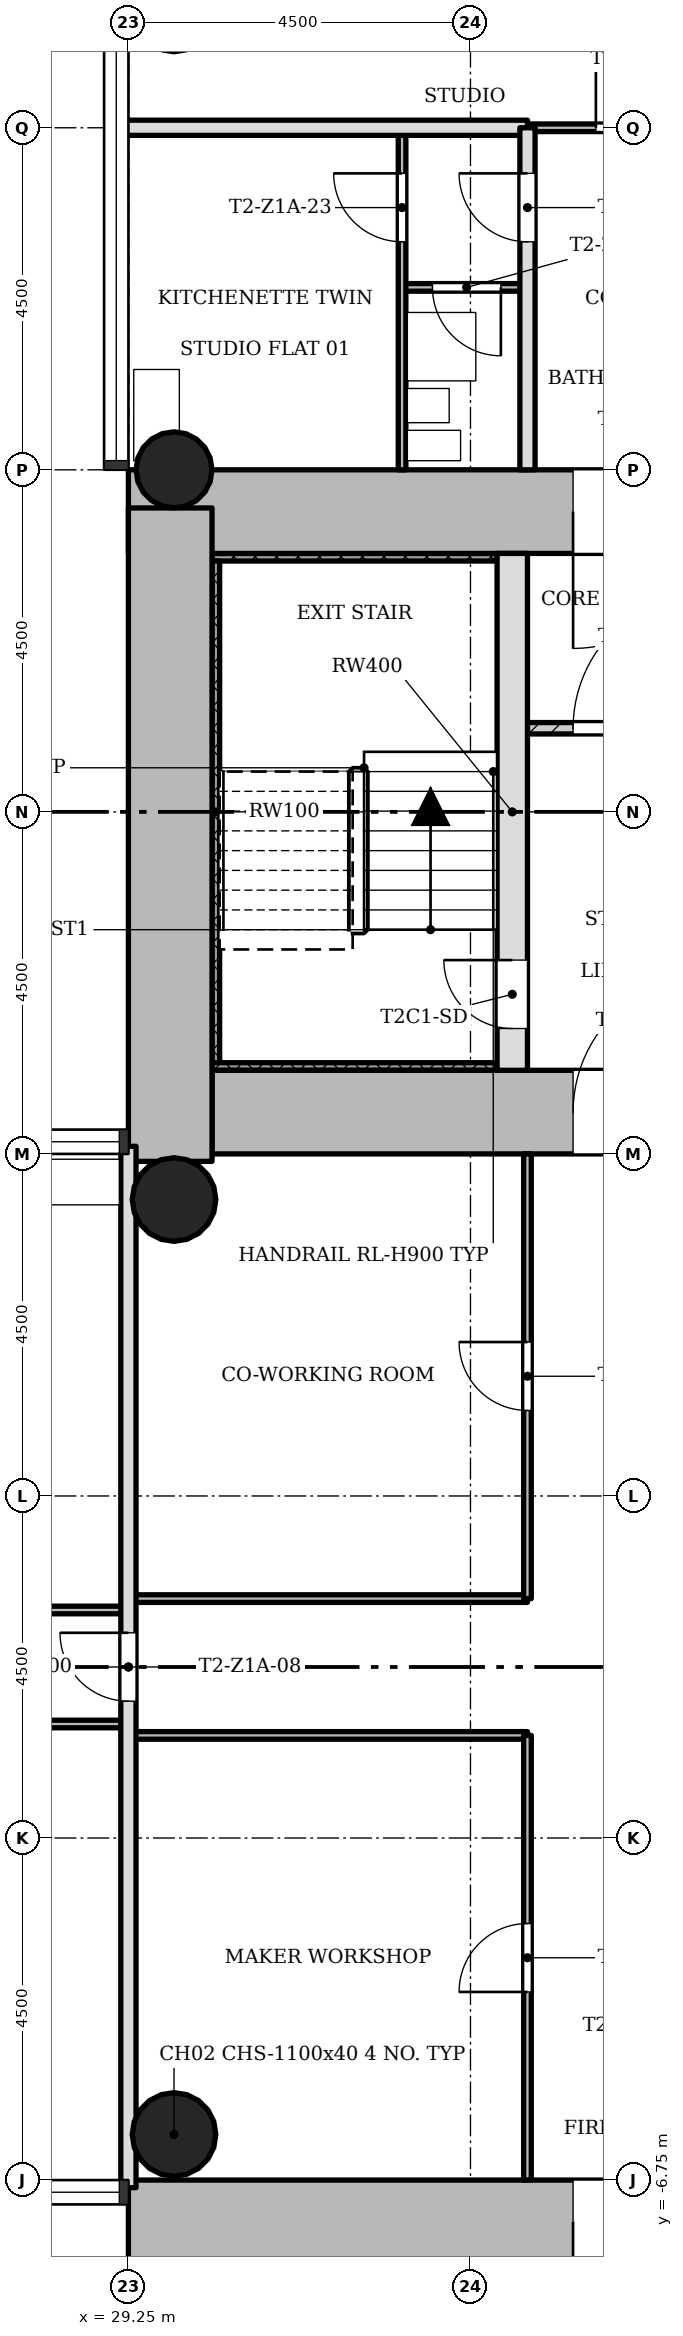
"""IFC4 building model, lengths in metres.
Left out: names, types, materials, properties, quantities, classifications, styles, units other than length and angle.
Written with IfcOpenShell. Run it as: python <this file> out.ifc"""

import sys

from ifc_helpers import new_model, si_unit, direction, frame, frame_2d, origin, origin_2d, place, context, subcontext, project, spatial, rectangle, hollow_circle, extrude, element, fill, save


model = new_model("IFC4")
c1 = context("Model", 3, precision=1e-05, world=origin(), true_north=direction((0.0, 1.0)))
c2 = subcontext(c1, "Body", "Model", "MODEL_VIEW")
j1 = project(units=[si_unit("LENGTHUNIT", "METRE"), si_unit("PLANEANGLEUNIT", "RADIAN")], contexts=[c1])
p1 = place(None, origin())
s1 = spatial("IfcSite", under=j1, at=p1, CompositionType="ELEMENT")
p2 = place(p1, origin())
s2 = spatial("IfcBuilding", under=s1, at=p2, CompositionType="ELEMENT")
p3 = place(p2, frame((0.0, 0.0, 27.9)))
s3 = spatial("IfcBuildingStorey", under=s2, at=p3, CompositionType="ELEMENT", Elevation=27.9)
p4 = place(p3, frame((30.35, 7.3, 0.0), z_axis=(0.0, 0.0, 1.0), x_axis=(1.0, 0.0, 0.0)))
e1 = element("IfcWall", 1, at=p4, inside=s3, PredefinedType="SHEAR", context=c2, shape_type="SweptSolid", body=[
    extrude(rectangle(XDim=12.4, YDim=1.1, at=frame_2d((6.2, 0.0))), origin(), (0.0, 0.0, 1.0), 3.4),
])
p5 = place(p4, frame((4.75, 0.0, 0.0)))
e2 = element("IfcOpeningElement", 2, at=p5, cuts=e1, PredefinedType="OPENING", context=c2, shape_type="SweptSolid", body=[
    extrude(rectangle(XDim=1.8, YDim=2.1, at=frame_2d((0.9, 1.05))), frame((0.0, 0.56, 0.0), z_axis=(0.0, -1.0, 0.0), x_axis=(1.0, 0.0, 0.0)), (0.0, 0.0, 1.0), 1.12),
])
p6 = place(p3, frame((41.65, 15.2, 0.0), z_axis=(0.0, 0.0, 1.0), x_axis=(-1.0, 0.0, 0.0)))
e3 = element("IfcWall", 3, at=p6, inside=s3, PredefinedType="SHEAR", context=c2, shape_type="SweptSolid", body=[
    extrude(rectangle(XDim=12.4, YDim=1.1, at=frame_2d((6.2, 0.0))), origin(), (0.0, 0.0, 1.0), 3.4),
])
p7 = place(p6, frame((4.75, 0.0, 0.0)))
e4 = element("IfcOpeningElement", 4, at=p7, cuts=e3, PredefinedType="OPENING", context=c2, shape_type="SweptSolid", body=[
    extrude(rectangle(XDim=1.8, YDim=2.1, at=frame_2d((0.9, 1.05))), frame((0.0, 0.56, 0.0), z_axis=(0.0, -1.0, 0.0), x_axis=(1.0, 0.0, 0.0)), (0.0, 0.0, 1.0), 1.12),
])
p8 = place(p3, frame((29.8, 15.248, 0.0), z_axis=(0.0, 0.0, 1.0), x_axis=(0.0, -1.0, 0.0)))
e5 = element("IfcWall", 5, at=p8, inside=s3, PredefinedType="SHEAR", context=c2, shape_type="SweptSolid", body=[
    extrude(rectangle(XDim=8.596, YDim=1.1, at=frame_2d((4.298, 0.0))), origin(), (0.0, 0.0, 1.0), 3.4),
])
p9 = place(p3, frame((34.3, 7.85, 0.0), z_axis=(0.0, 0.0, 1.0), x_axis=(0.0, 1.0, 0.0)))
e6 = element("IfcWall", 6, at=p9, inside=s3, PredefinedType="SHEAR", context=c2, shape_type="SweptSolid", body=[
    extrude(rectangle(XDim=6.8, YDim=0.4, at=frame_2d((3.4, 0.0))), origin(), (0.0, 0.0, 1.0), 3.4),
])
p10 = place(p9, frame((0.55, 0.0, 0.0)))
e7 = element("IfcOpeningElement", 7, at=p10, cuts=e6, PredefinedType="OPENING", context=c2, shape_type="SweptSolid", body=[
    extrude(rectangle(XDim=0.9, YDim=2.1, at=frame_2d((0.45, 1.05))), frame((0.0, 0.21, 0.0), z_axis=(0.0, -1.0, 0.0), x_axis=(1.0, 0.0, 0.0)), (0.0, 0.0, 1.0), 0.42),
])
p11 = place(p3, frame((41.65, -7.3, 0.0), z_axis=(0.0, 0.0, 1.0), x_axis=(-1.0, 0.0, 0.0)))
e8 = element("IfcWall", 8, at=p11, inside=s3, PredefinedType="SHEAR", context=c2, shape_type="SweptSolid", body=[
    extrude(rectangle(XDim=12.4, YDim=1.1, at=frame_2d((6.2, 0.0))), origin(), (0.0, 0.0, 1.0), 3.4),
])
p12 = place(p11, frame((4.75, 0.0, 0.0)))
e9 = element("IfcOpeningElement", 9, at=p12, cuts=e8, PredefinedType="OPENING", context=c2, shape_type="SweptSolid", body=[
    extrude(rectangle(XDim=1.8, YDim=2.1, at=frame_2d((0.9, 1.05))), frame((0.0, 0.56, 0.0), z_axis=(0.0, -1.0, 0.0), x_axis=(1.0, 0.0, 0.0)), (0.0, 0.0, 1.0), 1.12),
])
p13 = place(p3, frame((29.85, 15.75, 0.0), z_axis=(0.0, 0.0, 1.0), x_axis=(1.0, 0.0, 0.0)))
e10 = element("IfcColumn", 10, at=p13, inside=s3, PredefinedType="COLUMN", context=c2, shape_type="SweptSolid", body=[
    extrude(hollow_circle(Radius=0.5, WallThickness=0.036, at=origin_2d()), origin(), (0.0, 0.0, 1.0), 3.4),
])
for number, where, z_axis, x_axis in (
    (11, (29.85, 6.15, 0.0), (0.0, 0.0, 1.0), (1.0, 0.0, 0.0)),
    (12, (29.85, -6.15, 0.0), (0.0, 0.0, 1.0), (1.0, 0.0, 0.0)),
):
    element("IfcColumn", number, at=place(p3, frame(where, z_axis=z_axis, x_axis=x_axis)), inside=s3, PredefinedType="COLUMN", context=c2, shape_type="SweptSolid", body=[
        extrude(hollow_circle(Radius=0.55, WallThickness=0.04, at=origin_2d()), origin(), (0.0, 0.0, 1.0), 3.4),
    ])
p14 = place(p3, frame((37.5, 12.35, 0.0), z_axis=(0.0, 0.0, 1.0), x_axis=(-1.0, 0.0, 0.0)))
e13 = element("IfcWall", 13, at=p14, inside=s3, PredefinedType="PARTITIONING", context=c2, shape_type="SweptSolid", body=[
    extrude(rectangle(XDim=3.0, YDim=0.15, at=frame_2d((1.5, 0.0))), origin(), (0.0, 0.0, 1.0), 3.0),
])
p15 = place(p14, frame((0.6, 0.0, 0.0)))
e14 = element("IfcOpeningElement", 14, at=p15, cuts=e13, PredefinedType="OPENING", context=c2, shape_type="SweptSolid", body=[
    extrude(rectangle(XDim=1.8, YDim=2.1, at=frame_2d((0.9, 1.05))), frame((0.0, 0.085, 0.0), z_axis=(0.0, -1.0, 0.0), x_axis=(1.0, 0.0, 0.0)), (0.0, 0.0, 1.0), 0.17),
])
p16 = place(p3, frame((34.5, -0.9, 0.0), z_axis=(0.0, 0.0, 1.0), x_axis=(-1.0, 0.0, 0.0)))
e15 = element("IfcWall", 15, at=p16, inside=s3, PredefinedType="PARTITIONING", context=c2, shape_type="SweptSolid", body=[
    extrude(rectangle(XDim=5.25, YDim=0.1, at=frame_2d((2.625, 0.0))), origin(), (0.0, 0.0, 1.0), 3.0),
])
p17 = place(p3, frame((29.25, -0.75, 0.0), z_axis=(0.0, 0.0, 1.0), x_axis=(-1.0, 0.0, 0.0)))
e16 = element("IfcWall", 16, at=p17, inside=s3, PredefinedType="PARTITIONING", context=c2, shape_type="SweptSolid", body=[
    extrude(rectangle(XDim=7.8, YDim=0.1, at=frame_2d((3.9, 0.0))), origin(), (0.0, 0.0, 1.0), 3.0),
])
p18 = place(p17, frame((1.8, 0.0, 0.0)))
e17 = element("IfcOpeningElement", 17, at=p18, cuts=e16, PredefinedType="OPENING", context=c2, shape_type="SweptSolid", body=[
    extrude(rectangle(XDim=0.9, YDim=2.1, at=frame_2d((0.45, 1.05))), frame((0.0, 0.06, 0.0), z_axis=(0.0, -1.0, 0.0), x_axis=(1.0, 0.0, 0.0)), (0.0, 0.0, 1.0), 0.12),
])
p19 = place(p17, frame((4.95, 0.0, 0.0)))
e18 = element("IfcOpeningElement", 18, at=p19, cuts=e16, PredefinedType="OPENING", context=c2, shape_type="SweptSolid", body=[
    extrude(rectangle(XDim=0.9, YDim=2.1, at=frame_2d((0.45, 1.05))), frame((0.0, 0.06, 0.0), z_axis=(0.0, -1.0, 0.0), x_axis=(1.0, 0.0, 0.0)), (0.0, 0.0, 1.0), 0.12),
])
p20 = place(p17, frame((6.6, 0.0, 0.0)))
e19 = element("IfcOpeningElement", 19, at=p20, cuts=e16, PredefinedType="OPENING", context=c2, shape_type="SweptSolid", body=[
    extrude(rectangle(XDim=0.9, YDim=2.1, at=frame_2d((0.45, 1.05))), frame((0.0, 0.06, 0.0), z_axis=(0.0, -1.0, 0.0), x_axis=(1.0, 0.0, 0.0)), (0.0, 0.0, 1.0), 0.12),
])
p21 = place(p3, frame((29.25, 0.75, 0.0), z_axis=(0.0, 0.0, 1.0), x_axis=(-1.0, 0.0, 0.0)))
e20 = element("IfcWall", 20, at=p21, inside=s3, PredefinedType="PARTITIONING", context=c2, shape_type="SweptSolid", body=[
    extrude(rectangle(XDim=4.5, YDim=0.1, at=frame_2d((2.25, 0.0))), origin(), (0.0, 0.0, 1.0), 3.0),
])
p22 = place(p21, frame((1.8, 0.0, 0.0)))
e21 = element("IfcOpeningElement", 21, at=p22, cuts=e20, PredefinedType="OPENING", context=c2, shape_type="SweptSolid", body=[
    extrude(rectangle(XDim=0.9, YDim=2.1, at=frame_2d((0.45, 1.05))), frame((0.0, 0.06, 0.0), z_axis=(0.0, -1.0, 0.0), x_axis=(1.0, 0.0, 0.0)), (0.0, 0.0, 1.0), 0.12),
])
p23 = place(p3, frame((34.5, 0.9, 0.0), z_axis=(0.0, 0.0, 1.0), x_axis=(-1.0, 0.0, 0.0)))
e22 = element("IfcWall", 22, at=p23, inside=s3, PredefinedType="PARTITIONING", context=c2, shape_type="SweptSolid", body=[
    extrude(rectangle(XDim=5.25, YDim=0.1, at=frame_2d((2.625, 0.0))), origin(), (0.0, 0.0, 1.0), 3.0),
])
p24 = place(p3, frame((34.5, 18.15, 0.0), z_axis=(0.0, 0.0, 1.0), x_axis=(-1.0, 0.0, 0.0)))
e23 = element("IfcWall", 23, at=p24, inside=s3, PredefinedType="PARTITIONING", context=c2, shape_type="SweptSolid", body=[
    extrude(rectangle(XDim=1.65, YDim=0.1, at=frame_2d((0.825, 0.0))), origin(), (0.0, 0.0, 1.0), 3.0),
])
p25 = place(p24, frame((0.35, 0.0, 0.0)))
e24 = element("IfcOpeningElement", 24, at=p25, cuts=e23, PredefinedType="OPENING", context=c2, shape_type="SweptSolid", body=[
    extrude(rectangle(XDim=0.9, YDim=2.1, at=frame_2d((0.45, 1.05))), frame((0.0, 0.06, 0.0), z_axis=(0.0, -1.0, 0.0), x_axis=(1.0, 0.0, 0.0)), (0.0, 0.0, 1.0), 0.12),
])
p26 = place(p3, frame((37.5, 20.25, 0.0), z_axis=(0.0, 0.0, 1.0), x_axis=(-1.0, 0.0, 0.0)))
e25 = element("IfcWall", 25, at=p26, inside=s3, PredefinedType="PARTITIONING", context=c2, shape_type="SweptSolid", body=[
    extrude(rectangle(XDim=3.0, YDim=0.1, at=frame_2d((1.5, 0.0))), origin(), (0.0, 0.0, 1.0), 3.0),
])
p27 = place(p26, frame((0.9, 0.0, 0.0)))
e26 = element("IfcOpeningElement", 26, at=p27, cuts=e25, PredefinedType="OPENING", context=c2, shape_type="SweptSolid", body=[
    extrude(rectangle(XDim=1.2, YDim=2.1, at=frame_2d((0.6, 1.05))), frame((0.0, 0.06, 0.0), z_axis=(0.0, -1.0, 0.0), x_axis=(1.0, 0.0, 0.0)), (0.0, 0.0, 1.0), 0.12),
])
p28 = place(p3, frame((34.5, 20.25, 0.0), z_axis=(0.0, 0.0, 1.0), x_axis=(-1.0, 0.0, 0.0)))
e27 = element("IfcWall", 27, at=p28, inside=s3, PredefinedType="SOLIDWALL", context=c2, shape_type="SweptSolid", body=[
    extrude(rectangle(XDim=5.35, YDim=0.2, at=frame_2d((2.675, 0.0))), origin(), (0.0, 0.0, 1.0), 3.0),
])
p29 = place(p3, frame((34.5, -6.75, 0.0), z_axis=(0.0, 0.0, 1.0), x_axis=(0.0, 1.0, 0.0)))
e28 = element("IfcWall", 28, at=p29, inside=s3, PredefinedType="PARTITIONING", context=c2, shape_type="SweptSolid", body=[
    extrude(rectangle(XDim=5.85, YDim=0.1, at=frame_2d((2.925, 0.0))), origin(), (0.0, 0.0, 1.0), 3.0),
])
p30 = place(p29, frame((2.475, 0.0, 0.0)))
e29 = element("IfcOpeningElement", 29, at=p30, cuts=e28, PredefinedType="OPENING", context=c2, shape_type="SweptSolid", body=[
    extrude(rectangle(XDim=0.9, YDim=2.1, at=frame_2d((0.45, 1.05))), frame((0.0, 0.06, 0.0), z_axis=(0.0, -1.0, 0.0), x_axis=(1.0, 0.0, 0.0)), (0.0, 0.0, 1.0), 0.12),
])
p31 = place(p3, frame((34.5, 0.9, 0.0), z_axis=(0.0, 0.0, 1.0), x_axis=(0.0, 1.0, 0.0)))
e30 = element("IfcWall", 30, at=p31, inside=s3, PredefinedType="PARTITIONING", context=c2, shape_type="SweptSolid", body=[
    extrude(rectangle(XDim=5.85, YDim=0.1, at=frame_2d((2.925, 0.0))), origin(), (0.0, 0.0, 1.0), 3.0),
])
p32 = place(p31, frame((2.475, 0.0, 0.0)))
e31 = element("IfcOpeningElement", 31, at=p32, cuts=e30, PredefinedType="OPENING", context=c2, shape_type="SweptSolid", body=[
    extrude(rectangle(XDim=0.9, YDim=2.1, at=frame_2d((0.45, 1.05))), frame((0.0, 0.06, 0.0), z_axis=(0.0, -1.0, 0.0), x_axis=(1.0, 0.0, 0.0)), (0.0, 0.0, 1.0), 0.12),
])
p33 = place(p3, frame((34.5, 15.75, 0.0), z_axis=(0.0, 0.0, 1.0), x_axis=(0.0, 1.0, 0.0)))
e32 = element("IfcWall", 32, at=p33, inside=s3, PredefinedType="SOLIDWALL", context=c2, shape_type="SweptSolid", body=[
    extrude(rectangle(XDim=4.5, YDim=0.2, at=frame_2d((2.25, 0.0))), origin(), (0.0, 0.0, 1.0), 3.0),
])
p34 = place(p33, frame((3.0, 0.0, 0.0)))
e33 = element("IfcOpeningElement", 33, at=p34, cuts=e32, PredefinedType="OPENING", context=c2, shape_type="SweptSolid", body=[
    extrude(rectangle(XDim=0.9, YDim=2.1, at=frame_2d((0.45, 1.05))), frame((0.0, 0.11, 0.0), z_axis=(0.0, -1.0, 0.0), x_axis=(1.0, 0.0, 0.0)), (0.0, 0.0, 1.0), 0.22),
])
p35 = place(p3, frame((32.85, 15.75, 0.0), z_axis=(0.0, 0.0, 1.0), x_axis=(0.0, 1.0, 0.0)))
e34 = element("IfcWall", 34, at=p35, inside=s3, PredefinedType="PARTITIONING", context=c2, shape_type="SweptSolid", body=[
    extrude(rectangle(XDim=4.5, YDim=0.1, at=frame_2d((2.25, 0.0))), origin(), (0.0, 0.0, 1.0), 3.0),
])
p36 = place(p35, frame((3.0, 0.0, 0.0)))
e35 = element("IfcOpeningElement", 35, at=p36, cuts=e34, PredefinedType="OPENING", context=c2, shape_type="SweptSolid", body=[
    extrude(rectangle(XDim=0.9, YDim=2.1, at=frame_2d((0.45, 1.05))), frame((0.0, 0.06, 0.0), z_axis=(0.0, -1.0, 0.0), x_axis=(1.0, 0.0, 0.0)), (0.0, 0.0, 1.0), 0.12),
])
p37 = place(p3, frame((29.25, -6.85, 0.0), z_axis=(0.0, 0.0, 1.0), x_axis=(0.0, 1.0, 0.0)))
e36 = element("IfcWall", 36, at=p37, inside=s3, PredefinedType="SOLIDWALL", context=c2, shape_type="SweptSolid", body=[
    extrude(rectangle(XDim=13.7, YDim=0.2, at=frame_2d((6.85, 0.0))), origin(), (0.0, 0.0, 1.0), 3.0),
])
p38 = place(p37, frame((6.4, 0.0, 0.0)))
e37 = element("IfcOpeningElement", 37, at=p38, cuts=e36, PredefinedType="OPENING", context=c2, shape_type="SweptSolid", body=[
    extrude(rectangle(XDim=0.9, YDim=2.1, at=frame_2d((0.45, 1.05))), frame((0.0, 0.11, 0.0), z_axis=(0.0, -1.0, 0.0), x_axis=(1.0, 0.0, 0.0)), (0.0, 0.0, 1.0), 0.22),
])
p39 = place(p3, frame((34.1, 14.6, 0.0), z_axis=(0.0, 0.0, 1.0), x_axis=(-1.0, 0.0, 0.0)))
e38 = element("IfcWall", 38, at=p39, inside=s3, PredefinedType="SHEAR", context=c2, shape_type="SweptSolid", body=[
    extrude(rectangle(XDim=3.75, YDim=0.1, at=frame_2d((1.875, 0.0))), origin(), (0.0, 0.0, 1.0), 3.4),
])
p40 = place(p3, frame((30.4, 7.95, 0.0), z_axis=(0.0, 0.0, 1.0), x_axis=(0.0, 1.0, 0.0)))
e39 = element("IfcWall", 39, at=p40, inside=s3, PredefinedType="SHEAR", context=c2, shape_type="SweptSolid", body=[
    extrude(rectangle(XDim=6.6, YDim=0.1, at=frame_2d((3.3, 0.0))), origin(), (0.0, 0.0, 1.0), 3.4),
])
p41 = place(p3, frame((34.1, 7.9, 0.0), z_axis=(0.0, 0.0, 1.0), x_axis=(-1.0, 0.0, 0.0)))
e40 = element("IfcWall", 40, at=p41, inside=s3, PredefinedType="SHEAR", context=c2, shape_type="SweptSolid", body=[
    extrude(rectangle(XDim=3.75, YDim=0.1, at=frame_2d((1.875, 0.0))), origin(), (0.0, 0.0, 1.0), 3.4),
])
p42 = place(p15, origin())
e41 = element("IfcDoor", 41, at=p42, inside=s3, OperationType="SINGLE_SWING_LEFT", PredefinedType="DOOR", context=c2, shape_type="SweptSolid", body=[
    extrude(rectangle(XDim=1.8, YDim=2.1, at=frame_2d((0.9, 1.05))), frame((0.0, 0.025, 0.0), z_axis=(0.0, -1.0, 0.0), x_axis=(1.0, 0.0, 0.0)), (0.0, 0.0, 1.0), 0.05),
])
fill(e14, e41)
p43 = place(p32, origin())
e42 = element("IfcDoor", 42, at=p43, inside=s3, OperationType="SINGLE_SWING_LEFT", PredefinedType="DOOR", context=c2, shape_type="SweptSolid", body=[
    extrude(rectangle(XDim=0.9, YDim=2.1, at=frame_2d((0.45, 1.05))), frame((0.0, 0.025, 0.0), z_axis=(0.0, -1.0, 0.0), x_axis=(1.0, 0.0, 0.0)), (0.0, 0.0, 1.0), 0.05),
])
fill(e31, e42)
p44 = place(p30, origin())
e43 = element("IfcDoor", 43, at=p44, inside=s3, OperationType="SINGLE_SWING_RIGHT", PredefinedType="DOOR", context=c2, shape_type="SweptSolid", body=[
    extrude(rectangle(XDim=0.9, YDim=2.1, at=frame_2d((0.45, 1.05))), frame((0.0, 0.025, 0.0), z_axis=(0.0, -1.0, 0.0), x_axis=(1.0, 0.0, 0.0)), (0.0, 0.0, 1.0), 0.05),
])
fill(e29, e43)
p45 = place(p38, origin())
e44 = element("IfcDoor", 44, at=p45, inside=s3, OperationType="SINGLE_SWING_LEFT", PredefinedType="DOOR", context=c2, shape_type="SweptSolid", body=[
    extrude(rectangle(XDim=0.9, YDim=2.1, at=frame_2d((0.45, 1.05))), frame((0.0, 0.025, 0.0), z_axis=(0.0, -1.0, 0.0), x_axis=(1.0, 0.0, 0.0)), (0.0, 0.0, 1.0), 0.05),
])
fill(e37, e44)
p46 = place(p34, origin())
e45 = element("IfcDoor", 45, at=p46, inside=s3, OperationType="SINGLE_SWING_LEFT", PredefinedType="DOOR", context=c2, shape_type="SweptSolid", body=[
    extrude(rectangle(XDim=0.9, YDim=2.1, at=frame_2d((0.45, 1.05))), frame((0.0, 0.025, 0.0), z_axis=(0.0, -1.0, 0.0), x_axis=(1.0, 0.0, 0.0)), (0.0, 0.0, 1.0), 0.05),
])
fill(e33, e45)
p47 = place(p36, origin())
e46 = element("IfcDoor", 46, at=p47, inside=s3, OperationType="SINGLE_SWING_LEFT", PredefinedType="DOOR", context=c2, shape_type="SweptSolid", body=[
    extrude(rectangle(XDim=0.9, YDim=2.1, at=frame_2d((0.45, 1.05))), frame((0.0, 0.025, 0.0), z_axis=(0.0, -1.0, 0.0), x_axis=(1.0, 0.0, 0.0)), (0.0, 0.0, 1.0), 0.05),
])
fill(e35, e46)
p48 = place(p25, origin())
e47 = element("IfcDoor", 47, at=p48, inside=s3, OperationType="SINGLE_SWING_RIGHT", PredefinedType="DOOR", context=c2, shape_type="SweptSolid", body=[
    extrude(rectangle(XDim=0.9, YDim=2.1, at=frame_2d((0.45, 1.05))), frame((0.0, 0.025, 0.0), z_axis=(0.0, -1.0, 0.0), x_axis=(1.0, 0.0, 0.0)), (0.0, 0.0, 1.0), 0.05),
])
fill(e24, e47)
p49 = place(p27, origin())
e48 = element("IfcDoor", 48, at=p49, inside=s3, OperationType="SINGLE_SWING_RIGHT", PredefinedType="DOOR", context=c2, shape_type="SweptSolid", body=[
    extrude(rectangle(XDim=1.2, YDim=2.1, at=frame_2d((0.6, 1.05))), frame((0.0, 0.025, 0.0), z_axis=(0.0, -1.0, 0.0), x_axis=(1.0, 0.0, 0.0)), (0.0, 0.0, 1.0), 0.05),
])
fill(e26, e48)
p50 = place(p10, origin())
e49 = element("IfcDoor", 49, at=p50, inside=s3, OperationType="SINGLE_SWING_LEFT", PredefinedType="DOOR", context=c2, shape_type="SweptSolid", body=[
    extrude(rectangle(XDim=0.9, YDim=2.1, at=frame_2d((0.45, 1.05))), frame((0.0, 0.025, 0.0), z_axis=(0.0, -1.0, 0.0), x_axis=(1.0, 0.0, 0.0)), (0.0, 0.0, 1.0), 0.05),
])
fill(e7, e49)
p51 = place(p5, origin())
e50 = element("IfcDoor", 50, at=p51, inside=s3, OperationType="SINGLE_SWING_LEFT", PredefinedType="DOOR", context=c2, shape_type="SweptSolid", body=[
    extrude(rectangle(XDim=1.8, YDim=2.1, at=frame_2d((0.9, 1.05))), frame((0.0, 0.025, 0.0), z_axis=(0.0, -1.0, 0.0), x_axis=(1.0, 0.0, 0.0)), (0.0, 0.0, 1.0), 0.05),
])
fill(e2, e50)
p52 = place(p7, origin())
e51 = element("IfcDoor", 51, at=p52, inside=s3, OperationType="SINGLE_SWING_LEFT", PredefinedType="DOOR", context=c2, shape_type="SweptSolid", body=[
    extrude(rectangle(XDim=1.8, YDim=2.1, at=frame_2d((0.9, 1.05))), frame((0.0, 0.025, 0.0), z_axis=(0.0, -1.0, 0.0), x_axis=(1.0, 0.0, 0.0)), (0.0, 0.0, 1.0), 0.05),
])
fill(e4, e51)
p53 = place(p12, origin())
e52 = element("IfcDoor", 52, at=p53, inside=s3, OperationType="SINGLE_SWING_LEFT", PredefinedType="DOOR", context=c2, shape_type="SweptSolid", body=[
    extrude(rectangle(XDim=1.8, YDim=2.1, at=frame_2d((0.9, 1.05))), frame((0.0, 0.025, 0.0), z_axis=(0.0, -1.0, 0.0), x_axis=(1.0, 0.0, 0.0)), (0.0, 0.0, 1.0), 0.05),
])
fill(e9, e52)
save(model, sys.argv[1])
